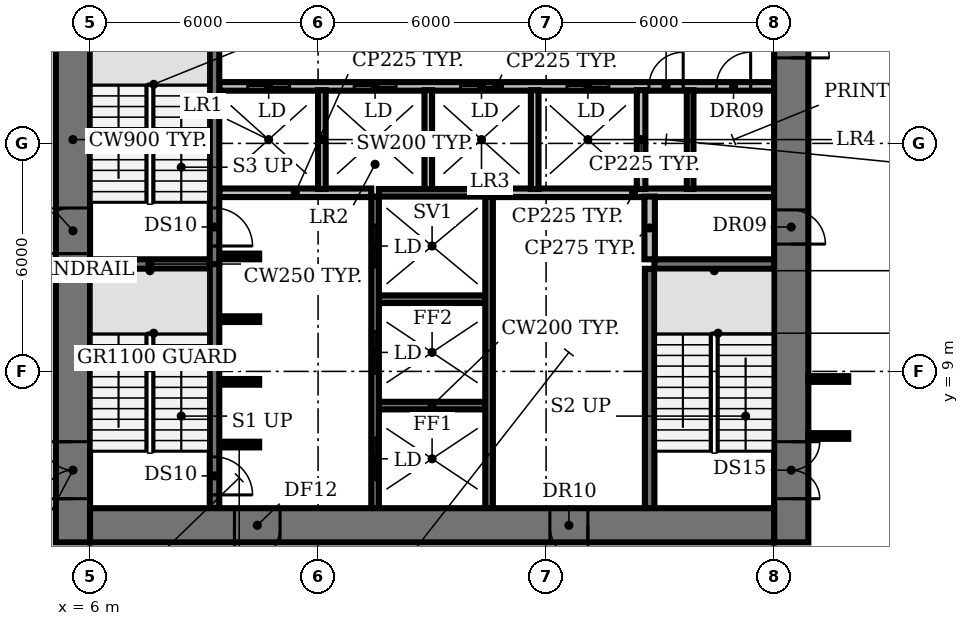
"""IFC4 building model, lengths in metres.
Left out: names, types, materials, properties, quantities, classifications, styles, units other than length and angle.
Written with IfcOpenShell. Run it as: python <this file> out.ifc"""

import sys

from ifc_helpers import new_model, si_unit, direction, frame, frame_2d, origin, place, context, subcontext, project, spatial, rectangle, extrude, element, fill, save


model = new_model("IFC4")
c1 = context("Model", 3, precision=1e-05, world=origin(), true_north=direction((0.0, 1.0)))
c2 = subcontext(c1, "Body", "Model", "MODEL_VIEW")
j1 = project(units=[si_unit("LENGTHUNIT", "METRE"), si_unit("PLANEANGLEUNIT", "RADIAN")], contexts=[c1])
p1 = place(None, origin())
s1 = spatial("IfcSite", under=j1, at=p1, CompositionType="ELEMENT")
p2 = place(p1, origin())
s2 = spatial("IfcBuilding", under=s1, at=p2, CompositionType="ELEMENT")
p3 = place(p2, frame((0.0, 0.0, 37.4)))
s3 = spatial("IfcBuildingStorey", under=s2, at=p3, CompositionType="ELEMENT", Elevation=37.4)
p4 = place(p3, frame((9.4, 7.075, 0.0), z_axis=(0.0, 0.0, 1.0), x_axis=(1.0, 0.0, 0.0)))
e1 = element("IfcWall", 1, at=p4, inside=s3, PredefinedType="SHEAR", context=c2, shape_type="SweptSolid", body=[
    extrude(rectangle(XDim=1.05, YDim=0.15, at=frame_2d((0.525, 0.0))), origin(), (0.0, 0.0, 1.0), 3.85),
])
p5 = place(p3, frame((13.6, 8.1, 0.0), z_axis=(0.0, 0.0, 1.0), x_axis=(1.0, 0.0, 0.0)))
e2 = element("IfcWall", 2, at=p5, inside=s3, PredefinedType="SHEAR", context=c2, shape_type="SweptSolid", body=[
    extrude(rectangle(XDim=2.8, YDim=0.2, at=frame_2d((1.4, 0.0))), origin(), (0.0, 0.0, 1.0), 3.85),
])
for number, where, z_axis, x_axis in (
    (3, (9.4, 8.725, 0.0), (0.0, 0.0, 1.0), (1.0, 0.0, 0.0)),
    (4, (9.4, 10.375, 0.0), (0.0, 0.0, 1.0), (1.0, 0.0, 0.0)),
):
    element("IfcWall", number, at=place(p3, frame(where, z_axis=z_axis, x_axis=x_axis)), inside=s3, PredefinedType="SHEAR", context=c2, shape_type="SweptSolid", body=[
        extrude(rectangle(XDim=1.05, YDim=0.15, at=frame_2d((0.525, 0.0))), origin(), (0.0, 0.0, 1.0), 3.85),
    ])
p6 = place(p3, frame((13.6, 10.9, 0.0), z_axis=(0.0, 0.0, 1.0), x_axis=(1.0, 0.0, 0.0)))
e5 = element("IfcWall", 5, at=p6, inside=s3, PredefinedType="SHEAR", context=c2, shape_type="SweptSolid", body=[
    extrude(rectangle(XDim=2.8, YDim=0.2, at=frame_2d((1.4, 0.0))), origin(), (0.0, 0.0, 1.0), 3.85),
])
for number, where, z_axis, x_axis in (
    (6, (6.0, 11.825, 0.0), (0.0, 0.0, 1.0), (1.0, 0.0, 0.0)),
    (7, (20.85, 11.825, 0.0), (0.0, 0.0, 1.0), (1.0, 0.0, 0.0)),
):
    element("IfcWall", number, at=place(p3, frame(where, z_axis=z_axis, x_axis=x_axis)), inside=s3, PredefinedType="SHEAR", context=c2, shape_type="SweptSolid", body=[
        extrude(rectangle(XDim=3.15, YDim=0.25, at=frame_2d((1.575, 0.0))), origin(), (0.0, 0.0, 1.0), 3.85),
    ])
p7 = place(p3, frame((9.4, 12.025, 0.0), z_axis=(0.0, 0.0, 1.0), x_axis=(1.0, 0.0, 0.0)))
e8 = element("IfcWall", 8, at=p7, inside=s3, PredefinedType="SHEAR", context=c2, shape_type="SweptSolid", body=[
    extrude(rectangle(XDim=1.05, YDim=0.15, at=frame_2d((0.525, 0.0))), origin(), (0.0, 0.0, 1.0), 3.85),
])
p8 = place(p3, frame((9.4, 13.7, 0.0), z_axis=(0.0, 0.0, 1.0), x_axis=(1.0, 0.0, 0.0)))
e9 = element("IfcWall", 9, at=p8, inside=s3, PredefinedType="PARTITIONING", context=c2, shape_type="SweptSolid", body=[
    extrude(rectangle(XDim=4.0, YDim=0.225, at=frame_2d((2.0, 0.0))), origin(), (0.0, 0.0, 1.0), 3.85),
])
p9 = place(p3, frame((13.6, 13.7, 0.0), z_axis=(0.0, 0.0, 1.0), x_axis=(1.0, 0.0, 0.0)))
e10 = element("IfcWall", 10, at=p9, inside=s3, PredefinedType="SHEAR", context=c2, shape_type="SweptSolid", body=[
    extrude(rectangle(XDim=2.8, YDim=0.2, at=frame_2d((1.4, 0.0))), origin(), (0.0, 0.0, 1.0), 3.85),
])
p10 = place(p3, frame((16.6, 13.7, 0.0), z_axis=(0.0, 0.0, 1.0), x_axis=(1.0, 0.0, 0.0)))
e11 = element("IfcWall", 11, at=p10, inside=s3, PredefinedType="PARTITIONING", context=c2, shape_type="SweptSolid", body=[
    extrude(rectangle(XDim=7.4, YDim=0.225, at=frame_2d((3.7, 0.0))), origin(), (0.0, 0.0, 1.0), 3.85),
])
p11 = place(p3, frame((9.4, 16.5, 0.0), z_axis=(0.0, 0.0, 1.0), x_axis=(1.0, 0.0, 0.0)))
e12 = element("IfcWall", 12, at=p11, inside=s3, PredefinedType="PARTITIONING", context=c2, shape_type="SweptSolid", body=[
    extrude(rectangle(XDim=14.6, YDim=0.225, at=frame_2d((7.3, 0.0))), origin(), (0.0, 0.0, 1.0), 3.85),
])
p12 = place(p11, frame((0.75, 0.0, 0.0)))
e13 = element("IfcOpeningElement", 13, at=p12, cuts=e12, PredefinedType="OPENING", context=c2, shape_type="SweptSolid", body=[
    extrude(rectangle(XDim=1.1, YDim=2.1, at=frame_2d((0.55, 1.05))), frame((0.0, 0.123, 0.0), z_axis=(0.0, -1.0, 0.0), x_axis=(1.0, 0.0, 0.0)), (0.0, 0.0, 1.0), 0.245),
])
p13 = place(p11, frame((3.55, 0.0, 0.0)))
e14 = element("IfcOpeningElement", 14, at=p13, cuts=e12, PredefinedType="OPENING", context=c2, shape_type="SweptSolid", body=[
    extrude(rectangle(XDim=1.1, YDim=2.1, at=frame_2d((0.55, 1.05))), frame((0.0, 0.123, 0.0), z_axis=(0.0, -1.0, 0.0), x_axis=(1.0, 0.0, 0.0)), (0.0, 0.0, 1.0), 0.245),
])
p14 = place(p11, frame((6.35, 0.0, 0.0)))
e15 = element("IfcOpeningElement", 15, at=p14, cuts=e12, PredefinedType="OPENING", context=c2, shape_type="SweptSolid", body=[
    extrude(rectangle(XDim=1.1, YDim=2.1, at=frame_2d((0.55, 1.05))), frame((0.0, 0.123, 0.0), z_axis=(0.0, -1.0, 0.0), x_axis=(1.0, 0.0, 0.0)), (0.0, 0.0, 1.0), 0.245),
])
p15 = place(p11, frame((9.15, 0.0, 0.0)))
e16 = element("IfcOpeningElement", 16, at=p15, cuts=e12, PredefinedType="OPENING", context=c2, shape_type="SweptSolid", body=[
    extrude(rectangle(XDim=1.1, YDim=2.1, at=frame_2d((0.55, 1.05))), frame((0.0, 0.123, 0.0), z_axis=(0.0, -1.0, 0.0), x_axis=(1.0, 0.0, 0.0)), (0.0, 0.0, 1.0), 0.245),
])
p16 = place(p11, frame((11.308, 0.0, 0.0)))
e17 = element("IfcOpeningElement", 17, at=p16, cuts=e12, PredefinedType="OPENING", context=c2, shape_type="SweptSolid", body=[
    extrude(rectangle(XDim=0.9, YDim=2.1, at=frame_2d((0.45, 1.05))), frame((0.0, 0.123, 0.0), z_axis=(0.0, -1.0, 0.0), x_axis=(1.0, 0.0, 0.0)), (0.0, 0.0, 1.0), 0.245),
])
p17 = place(p11, frame((13.083, 0.0, 0.0)))
e18 = element("IfcOpeningElement", 18, at=p17, cuts=e12, PredefinedType="OPENING", context=c2, shape_type="SweptSolid", body=[
    extrude(rectangle(XDim=0.9, YDim=2.1, at=frame_2d((0.45, 1.05))), frame((0.0, 0.123, 0.0), z_axis=(0.0, -1.0, 0.0), x_axis=(1.0, 0.0, 0.0)), (0.0, 0.0, 1.0), 0.245),
])
p18 = place(p3, frame((9.275, 11.825, 0.0), z_axis=(0.0, 0.0, 1.0), x_axis=(0.0, -1.0, 0.0)))
e19 = element("IfcWall", 19, at=p18, inside=s3, PredefinedType="SHEAR", context=c2, shape_type="SweptSolid", body=[
    extrude(rectangle(XDim=6.425, YDim=0.25, at=frame_2d((3.212, 0.0))), origin(), (0.0, 0.0, 1.0), 3.85),
])
p19 = place(p18, frame((5.075, 0.0, 0.0)))
e20 = element("IfcOpeningElement", 20, at=p19, cuts=e19, PredefinedType="OPENING", context=c2, shape_type="SweptSolid", body=[
    extrude(rectangle(XDim=1.0, YDim=2.1, at=frame_2d((0.5, 1.05))), frame((0.0, 0.135, 0.0), z_axis=(0.0, -1.0, 0.0), x_axis=(1.0, 0.0, 0.0)), (0.0, 0.0, 1.0), 0.27),
])
p20 = place(p3, frame((9.275, 18.375, 0.0), z_axis=(0.0, 0.0, 1.0), x_axis=(0.0, -1.0, 0.0)))
e21 = element("IfcWall", 21, at=p20, inside=s3, PredefinedType="SHEAR", context=c2, shape_type="SweptSolid", body=[
    extrude(rectangle(XDim=6.55, YDim=0.25, at=frame_2d((3.275, 0.0))), origin(), (0.0, 0.0, 1.0), 3.85),
])
p21 = place(p20, frame((5.075, 0.0, 0.0)))
e22 = element("IfcOpeningElement", 22, at=p21, cuts=e21, PredefinedType="OPENING", context=c2, shape_type="SweptSolid", body=[
    extrude(rectangle(XDim=1.0, YDim=2.1, at=frame_2d((0.5, 1.05))), frame((0.0, 0.135, 0.0), z_axis=(0.0, -1.0, 0.0), x_axis=(1.0, 0.0, 0.0)), (0.0, 0.0, 1.0), 0.27),
])
p22 = place(p3, frame((12.1, 13.8, 0.0), z_axis=(0.0, 0.0, 1.0), x_axis=(0.0, 1.0, 0.0)))
e23 = element("IfcWall", 23, at=p22, inside=s3, PredefinedType="SOLIDWALL", context=c2, shape_type="SweptSolid", body=[
    extrude(rectangle(XDim=2.6, YDim=0.2, at=frame_2d((1.3, 0.0))), origin(), (0.0, 0.0, 1.0), 3.85),
])
p23 = place(p3, frame((13.5, 5.4, 0.0), z_axis=(0.0, 0.0, 1.0), x_axis=(0.0, 1.0, 0.0)))
e24 = element("IfcWall", 24, at=p23, inside=s3, PredefinedType="SHEAR", context=c2, shape_type="SweptSolid", body=[
    extrude(rectangle(XDim=8.2, YDim=0.2, at=frame_2d((4.1, 0.0))), origin(), (0.0, 0.0, 1.0), 3.85),
])
p24 = place(p23, frame((0.75, 0.0, 0.0)))
e25 = element("IfcOpeningElement", 25, at=p24, cuts=e24, PredefinedType="OPENING", context=c2, shape_type="SweptSolid", body=[
    extrude(rectangle(XDim=1.1, YDim=2.1, at=frame_2d((0.55, 1.05))), frame((0.0, 0.11, 0.0), z_axis=(0.0, -1.0, 0.0), x_axis=(1.0, 0.0, 0.0)), (0.0, 0.0, 1.0), 0.22),
])
p25 = place(p23, frame((3.55, 0.0, 0.0)))
e26 = element("IfcOpeningElement", 26, at=p25, cuts=e24, PredefinedType="OPENING", context=c2, shape_type="SweptSolid", body=[
    extrude(rectangle(XDim=1.1, YDim=2.1, at=frame_2d((0.55, 1.05))), frame((0.0, 0.11, 0.0), z_axis=(0.0, -1.0, 0.0), x_axis=(1.0, 0.0, 0.0)), (0.0, 0.0, 1.0), 0.22),
])
p26 = place(p23, frame((6.35, 0.0, 0.0)))
e27 = element("IfcOpeningElement", 27, at=p26, cuts=e24, PredefinedType="OPENING", context=c2, shape_type="SweptSolid", body=[
    extrude(rectangle(XDim=1.1, YDim=2.1, at=frame_2d((0.55, 1.05))), frame((0.0, 0.11, 0.0), z_axis=(0.0, -1.0, 0.0), x_axis=(1.0, 0.0, 0.0)), (0.0, 0.0, 1.0), 0.22),
])
p27 = place(p3, frame((14.9, 13.8, 0.0), z_axis=(0.0, 0.0, 1.0), x_axis=(0.0, 1.0, 0.0)))
e28 = element("IfcWall", 28, at=p27, inside=s3, PredefinedType="SOLIDWALL", context=c2, shape_type="SweptSolid", body=[
    extrude(rectangle(XDim=2.6, YDim=0.2, at=frame_2d((1.3, 0.0))), origin(), (0.0, 0.0, 1.0), 3.85),
])
p28 = place(p3, frame((16.5, 5.4, 0.0), z_axis=(0.0, 0.0, 1.0), x_axis=(0.0, 1.0, 0.0)))
e29 = element("IfcWall", 29, at=p28, inside=s3, PredefinedType="SHEAR", context=c2, shape_type="SweptSolid", body=[
    extrude(rectangle(XDim=8.2, YDim=0.2, at=frame_2d((4.1, 0.0))), origin(), (0.0, 0.0, 1.0), 3.85),
])
p29 = place(p3, frame((17.7, 13.8, 0.0), z_axis=(0.0, 0.0, 1.0), x_axis=(0.0, 1.0, 0.0)))
e30 = element("IfcWall", 30, at=p29, inside=s3, PredefinedType="SOLIDWALL", context=c2, shape_type="SweptSolid", body=[
    extrude(rectangle(XDim=2.6, YDim=0.2, at=frame_2d((1.3, 0.0))), origin(), (0.0, 0.0, 1.0), 3.85),
])
p30 = place(p3, frame((20.5, 13.8, 0.0), z_axis=(0.0, 0.0, 1.0), x_axis=(0.0, 1.0, 0.0)))
e31 = element("IfcWall", 31, at=p30, inside=s3, PredefinedType="PARTITIONING", context=c2, shape_type="SweptSolid", body=[
    extrude(rectangle(XDim=2.6, YDim=0.225, at=frame_2d((1.3, 0.0))), origin(), (0.0, 0.0, 1.0), 3.85),
])
p31 = place(p3, frame((20.725, 5.4, 0.0), z_axis=(0.0, 0.0, 1.0), x_axis=(0.0, 1.0, 0.0)))
e32 = element("IfcWall", 32, at=p31, inside=s3, PredefinedType="SHEAR", context=c2, shape_type="SweptSolid", body=[
    extrude(rectangle(XDim=6.3, YDim=0.25, at=frame_2d((3.15, 0.0))), origin(), (0.0, 0.0, 1.0), 3.85),
])
p32 = place(p3, frame((20.725, 11.95, 0.0), z_axis=(0.0, 0.0, 1.0), x_axis=(0.0, 1.0, 0.0)))
e33 = element("IfcWall", 33, at=p32, inside=s3, PredefinedType="PARTITIONING", context=c2, shape_type="SweptSolid", body=[
    extrude(rectangle(XDim=1.65, YDim=0.275, at=frame_2d((0.825, 0.0))), origin(), (0.0, 0.0, 1.0), 3.85),
])
p33 = place(p3, frame((21.79, 13.8, 0.0), z_axis=(0.0, 0.0, 1.0), x_axis=(0.0, 1.0, 0.0)))
e34 = element("IfcWall", 34, at=p33, inside=s3, PredefinedType="PARTITIONING", context=c2, shape_type="SweptSolid", body=[
    extrude(rectangle(XDim=2.6, YDim=0.175, at=frame_2d((1.3, 0.0))), origin(), (0.0, 0.0, 1.0), 3.85),
])
p34 = place(p3, frame((5.55, 4.5, 0.0), z_axis=(0.0, 0.0, 1.0), x_axis=(0.0, 1.0, 0.0)))
e35 = element("IfcWall", 35, at=p34, inside=s3, PredefinedType="SHEAR", context=c2, shape_type="SweptSolid", body=[
    extrude(rectangle(XDim=21.2, YDim=0.9, at=frame_2d((10.6, 0.0))), origin(), (0.0, 0.0, 1.0), 3.85),
])
p35 = place(p34, frame((1.15, 0.0, 0.0)))
e36 = element("IfcOpeningElement", 36, at=p35, cuts=e35, PredefinedType="OPENING", context=c2, shape_type="SweptSolid", body=[
    extrude(rectangle(XDim=1.5, YDim=2.1, at=frame_2d((0.75, 1.05))), frame((0.0, 0.46, 0.0), z_axis=(0.0, -1.0, 0.0), x_axis=(1.0, 0.0, 0.0)), (0.0, 0.0, 1.0), 0.92),
])
p36 = place(p34, frame((7.6, 0.0, 0.0)))
e37 = element("IfcOpeningElement", 37, at=p36, cuts=e35, PredefinedType="OPENING", context=c2, shape_type="SweptSolid", body=[
    extrude(rectangle(XDim=1.2, YDim=2.1, at=frame_2d((0.6, 1.05))), frame((0.0, 0.46, 0.0), z_axis=(0.0, -1.0, 0.0), x_axis=(1.0, 0.0, 0.0)), (0.0, 0.0, 1.0), 0.92),
])
p37 = place(p34, frame((14.15, 0.0, 0.0)))
e38 = element("IfcOpeningElement", 38, at=p37, cuts=e35, PredefinedType="OPENING", context=c2, shape_type="SweptSolid", body=[
    extrude(rectangle(XDim=1.2, YDim=2.1, at=frame_2d((0.6, 1.05))), frame((0.0, 0.46, 0.0), z_axis=(0.0, -1.0, 0.0), x_axis=(1.0, 0.0, 0.0)), (0.0, 0.0, 1.0), 0.92),
])
p38 = place(p3, frame((24.45, 25.7, 0.0), z_axis=(0.0, 0.0, 1.0), x_axis=(0.0, -1.0, 0.0)))
e39 = element("IfcWall", 39, at=p38, inside=s3, PredefinedType="SHEAR", context=c2, shape_type="SweptSolid", body=[
    extrude(rectangle(XDim=21.2, YDim=0.9, at=frame_2d((10.6, 0.0))), origin(), (0.0, 0.0, 1.0), 3.85),
])
p39 = place(p38, frame((18.55, 0.0, 0.0)))
e40 = element("IfcOpeningElement", 40, at=p39, cuts=e39, PredefinedType="OPENING", context=c2, shape_type="SweptSolid", body=[
    extrude(rectangle(XDim=1.5, YDim=2.1, at=frame_2d((0.75, 1.05))), frame((0.0, 0.46, 0.0), z_axis=(0.0, -1.0, 0.0), x_axis=(1.0, 0.0, 0.0)), (0.0, 0.0, 1.0), 0.92),
])
p40 = place(p38, frame((12.45, 0.0, 0.0)))
e41 = element("IfcOpeningElement", 41, at=p40, cuts=e39, PredefinedType="OPENING", context=c2, shape_type="SweptSolid", body=[
    extrude(rectangle(XDim=0.9, YDim=2.1, at=frame_2d((0.45, 1.05))), frame((0.0, 0.46, 0.0), z_axis=(0.0, -1.0, 0.0), x_axis=(1.0, 0.0, 0.0)), (0.0, 0.0, 1.0), 0.92),
])
p41 = place(p38, frame((6.45, 0.0, 0.0)))
e42 = element("IfcOpeningElement", 42, at=p41, cuts=e39, PredefinedType="OPENING", context=c2, shape_type="SweptSolid", body=[
    extrude(rectangle(XDim=2.0, YDim=2.1, at=frame_2d((1.0, 1.05))), frame((0.0, 0.46, 0.0), z_axis=(0.0, -1.0, 0.0), x_axis=(1.0, 0.0, 0.0)), (0.0, 0.0, 1.0), 0.92),
])
p42 = place(p3, frame((24.0, 4.95, 0.0), z_axis=(0.0, 0.0, 1.0), x_axis=(-1.0, 0.0, 0.0)))
e43 = element("IfcWall", 43, at=p42, inside=s3, PredefinedType="SHEAR", context=c2, shape_type="SweptSolid", body=[
    extrude(rectangle(XDim=18.0, YDim=0.9, at=frame_2d((9.0, 0.0))), origin(), (0.0, 0.0, 1.0), 3.85),
])
p43 = place(p42, frame((13.0, 0.0, 0.0)))
e44 = element("IfcOpeningElement", 44, at=p43, cuts=e43, PredefinedType="OPENING", context=c2, shape_type="SweptSolid", body=[
    extrude(rectangle(XDim=1.2, YDim=2.1, at=frame_2d((0.6, 1.05))), frame((0.0, 0.46, 0.0), z_axis=(0.0, -1.0, 0.0), x_axis=(1.0, 0.0, 0.0)), (0.0, 0.0, 1.0), 0.92),
])
p44 = place(p42, frame((4.9, 0.0, 0.0)))
e45 = element("IfcOpeningElement", 45, at=p44, cuts=e43, PredefinedType="OPENING", context=c2, shape_type="SweptSolid", body=[
    extrude(rectangle(XDim=1.0, YDim=2.1, at=frame_2d((0.5, 1.05))), frame((0.0, 0.46, 0.0), z_axis=(0.0, -1.0, 0.0), x_axis=(1.0, 0.0, 0.0)), (0.0, 0.0, 1.0), 0.92),
])
for number, where, z_axis, x_axis in (
    (46, (24.9, 7.3, 0.0), (0.0, 0.0, 1.0), (1.0, 0.0, 0.0)),
    (47, (24.9, 8.8, 0.0), (0.0, 0.0, 1.0), (1.0, 0.0, 0.0)),
):
    element("IfcWall", number, at=place(p3, frame(where, z_axis=z_axis, x_axis=x_axis)), inside=s3, PredefinedType="PARTITIONING", context=c2, shape_type="SweptSolid", body=[
        extrude(rectangle(XDim=1.05, YDim=0.15, at=frame_2d((0.525, 0.0))), origin(), (0.0, 0.0, 1.0), 2.83),
    ])
p45 = place(p12, origin())
e48 = element("IfcDoor", 48, at=p45, inside=s3, OperationType="DOUBLE_DOOR_SLIDING", PredefinedType="DOOR", context=c2, shape_type="SweptSolid", body=[
    extrude(rectangle(XDim=1.1, YDim=2.1, at=frame_2d((0.55, 1.05))), frame((0.0, 0.025, 0.0), z_axis=(0.0, -1.0, 0.0), x_axis=(1.0, 0.0, 0.0)), (0.0, 0.0, 1.0), 0.05),
])
fill(e13, e48)
p46 = place(p13, origin())
e49 = element("IfcDoor", 49, at=p46, inside=s3, OperationType="DOUBLE_DOOR_SLIDING", PredefinedType="DOOR", context=c2, shape_type="SweptSolid", body=[
    extrude(rectangle(XDim=1.1, YDim=2.1, at=frame_2d((0.55, 1.05))), frame((0.0, 0.025, 0.0), z_axis=(0.0, -1.0, 0.0), x_axis=(1.0, 0.0, 0.0)), (0.0, 0.0, 1.0), 0.05),
])
fill(e14, e49)
p47 = place(p14, origin())
e50 = element("IfcDoor", 50, at=p47, inside=s3, OperationType="DOUBLE_DOOR_SLIDING", PredefinedType="DOOR", context=c2, shape_type="SweptSolid", body=[
    extrude(rectangle(XDim=1.1, YDim=2.1, at=frame_2d((0.55, 1.05))), frame((0.0, 0.025, 0.0), z_axis=(0.0, -1.0, 0.0), x_axis=(1.0, 0.0, 0.0)), (0.0, 0.0, 1.0), 0.05),
])
fill(e15, e50)
p48 = place(p15, origin())
e51 = element("IfcDoor", 51, at=p48, inside=s3, OperationType="DOUBLE_DOOR_SLIDING", PredefinedType="DOOR", context=c2, shape_type="SweptSolid", body=[
    extrude(rectangle(XDim=1.1, YDim=2.1, at=frame_2d((0.55, 1.05))), frame((0.0, 0.025, 0.0), z_axis=(0.0, -1.0, 0.0), x_axis=(1.0, 0.0, 0.0)), (0.0, 0.0, 1.0), 0.05),
])
fill(e16, e51)
p49 = place(p16, origin())
e52 = element("IfcDoor", 52, at=p49, inside=s3, OperationType="SINGLE_SWING_RIGHT", PredefinedType="DOOR", context=c2, shape_type="SweptSolid", body=[
    extrude(rectangle(XDim=0.9, YDim=2.1, at=frame_2d((0.45, 1.05))), frame((0.0, 0.025, 0.0), z_axis=(0.0, -1.0, 0.0), x_axis=(1.0, 0.0, 0.0)), (0.0, 0.0, 1.0), 0.05),
])
fill(e17, e52)
p50 = place(p17, origin())
e53 = element("IfcDoor", 53, at=p50, inside=s3, OperationType="SINGLE_SWING_RIGHT", PredefinedType="DOOR", context=c2, shape_type="SweptSolid", body=[
    extrude(rectangle(XDim=0.9, YDim=2.1, at=frame_2d((0.45, 1.05))), frame((0.0, 0.025, 0.0), z_axis=(0.0, -1.0, 0.0), x_axis=(1.0, 0.0, 0.0)), (0.0, 0.0, 1.0), 0.05),
])
fill(e18, e53)
p51 = place(p19, origin())
e54 = element("IfcDoor", 54, at=p51, inside=s3, OperationType="SINGLE_SWING_RIGHT", PredefinedType="DOOR", context=c2, shape_type="SweptSolid", body=[
    extrude(rectangle(XDim=1.0, YDim=2.1, at=frame_2d((0.5, 1.05))), frame((0.0, 0.025, 0.0), z_axis=(0.0, -1.0, 0.0), x_axis=(1.0, 0.0, 0.0)), (0.0, 0.0, 1.0), 0.05),
])
fill(e20, e54)
p52 = place(p21, origin())
e55 = element("IfcDoor", 55, at=p52, inside=s3, OperationType="SINGLE_SWING_RIGHT", PredefinedType="DOOR", context=c2, shape_type="SweptSolid", body=[
    extrude(rectangle(XDim=1.0, YDim=2.1, at=frame_2d((0.5, 1.05))), frame((0.0, 0.025, 0.0), z_axis=(0.0, -1.0, 0.0), x_axis=(1.0, 0.0, 0.0)), (0.0, 0.0, 1.0), 0.05),
])
fill(e22, e55)
p53 = place(p24, origin())
e56 = element("IfcDoor", 56, at=p53, inside=s3, OperationType="DOUBLE_DOOR_SLIDING", PredefinedType="DOOR", context=c2, shape_type="SweptSolid", body=[
    extrude(rectangle(XDim=1.1, YDim=2.1, at=frame_2d((0.55, 1.05))), frame((0.0, 0.025, 0.0), z_axis=(0.0, -1.0, 0.0), x_axis=(1.0, 0.0, 0.0)), (0.0, 0.0, 1.0), 0.05),
])
fill(e25, e56)
p54 = place(p25, origin())
e57 = element("IfcDoor", 57, at=p54, inside=s3, OperationType="DOUBLE_DOOR_SLIDING", PredefinedType="DOOR", context=c2, shape_type="SweptSolid", body=[
    extrude(rectangle(XDim=1.1, YDim=2.1, at=frame_2d((0.55, 1.05))), frame((0.0, 0.025, 0.0), z_axis=(0.0, -1.0, 0.0), x_axis=(1.0, 0.0, 0.0)), (0.0, 0.0, 1.0), 0.05),
])
fill(e26, e57)
p55 = place(p26, origin())
e58 = element("IfcDoor", 58, at=p55, inside=s3, OperationType="DOUBLE_DOOR_SLIDING", PredefinedType="DOOR", context=c2, shape_type="SweptSolid", body=[
    extrude(rectangle(XDim=1.1, YDim=2.1, at=frame_2d((0.55, 1.05))), frame((0.0, 0.025, 0.0), z_axis=(0.0, -1.0, 0.0), x_axis=(1.0, 0.0, 0.0)), (0.0, 0.0, 1.0), 0.05),
])
fill(e27, e58)
p56 = place(p35, origin())
e59 = element("IfcDoor", 59, at=p56, inside=s3, OperationType="DOUBLE_DOOR_SINGLE_SWING", PredefinedType="DOOR", context=c2, shape_type="SweptSolid", body=[
    extrude(rectangle(XDim=1.5, YDim=2.1, at=frame_2d((0.75, 1.05))), frame((0.0, 0.025, 0.0), z_axis=(0.0, -1.0, 0.0), x_axis=(1.0, 0.0, 0.0)), (0.0, 0.0, 1.0), 0.05),
])
fill(e36, e59)
p57 = place(p36, origin())
e60 = element("IfcDoor", 60, at=p57, inside=s3, OperationType="SINGLE_SWING_LEFT", PredefinedType="DOOR", context=c2, shape_type="SweptSolid", body=[
    extrude(rectangle(XDim=1.2, YDim=2.1, at=frame_2d((0.6, 1.05))), frame((0.0, 0.025, 0.0), z_axis=(0.0, -1.0, 0.0), x_axis=(1.0, 0.0, 0.0)), (0.0, 0.0, 1.0), 0.05),
])
fill(e37, e60)
p58 = place(p39, origin())
e61 = element("IfcDoor", 61, at=p58, inside=s3, OperationType="DOUBLE_DOOR_SINGLE_SWING", PredefinedType="DOOR", context=c2, shape_type="SweptSolid", body=[
    extrude(rectangle(XDim=1.5, YDim=2.1, at=frame_2d((0.75, 1.05))), frame((0.0, 0.025, 0.0), z_axis=(0.0, -1.0, 0.0), x_axis=(1.0, 0.0, 0.0)), (0.0, 0.0, 1.0), 0.05),
])
fill(e40, e61)
p59 = place(p40, origin())
e62 = element("IfcDoor", 62, at=p59, inside=s3, OperationType="SINGLE_SWING_RIGHT", PredefinedType="DOOR", context=c2, shape_type="SweptSolid", body=[
    extrude(rectangle(XDim=0.9, YDim=2.1, at=frame_2d((0.45, 1.05))), frame((0.0, -0.39, 0.0), z_axis=(0.0, -1.0, 0.0), x_axis=(1.0, 0.0, 0.0)), (0.0, 0.0, 1.0), 0.05),
])
fill(e41, e62)
p60 = place(p41, origin())
e63 = element("IfcDoor", 63, at=p60, inside=s3, OperationType="DOUBLE_DOOR_SINGLE_SWING", PredefinedType="DOOR", context=c2, shape_type="SweptSolid", body=[
    extrude(rectangle(XDim=2.0, YDim=2.1, at=frame_2d((1.0, 1.05))), frame((0.0, 0.025, 0.0), z_axis=(0.0, -1.0, 0.0), x_axis=(1.0, 0.0, 0.0)), (0.0, 0.0, 1.0), 0.05),
])
fill(e42, e63)
p61 = place(p43, origin())
e64 = element("IfcDoor", 64, at=p61, inside=s3, OperationType="SINGLE_SWING_RIGHT", PredefinedType="DOOR", context=c2, shape_type="SweptSolid", body=[
    extrude(rectangle(XDim=1.2, YDim=2.1, at=frame_2d((0.6, 1.05))), frame((0.0, 0.025, 0.0), z_axis=(0.0, -1.0, 0.0), x_axis=(1.0, 0.0, 0.0)), (0.0, 0.0, 1.0), 0.05),
])
fill(e44, e64)
p62 = place(p44, origin())
e65 = element("IfcDoor", 65, at=p62, inside=s3, OperationType="SINGLE_SWING_LEFT", PredefinedType="DOOR", context=c2, shape_type="SweptSolid", body=[
    extrude(rectangle(XDim=1.0, YDim=2.1, at=frame_2d((0.5, 1.05))), frame((0.0, -0.39, 0.0), z_axis=(0.0, -1.0, 0.0), x_axis=(1.0, 0.0, 0.0)), (0.0, 0.0, 1.0), 0.05),
])
fill(e45, e65)
save(model, sys.argv[1])
